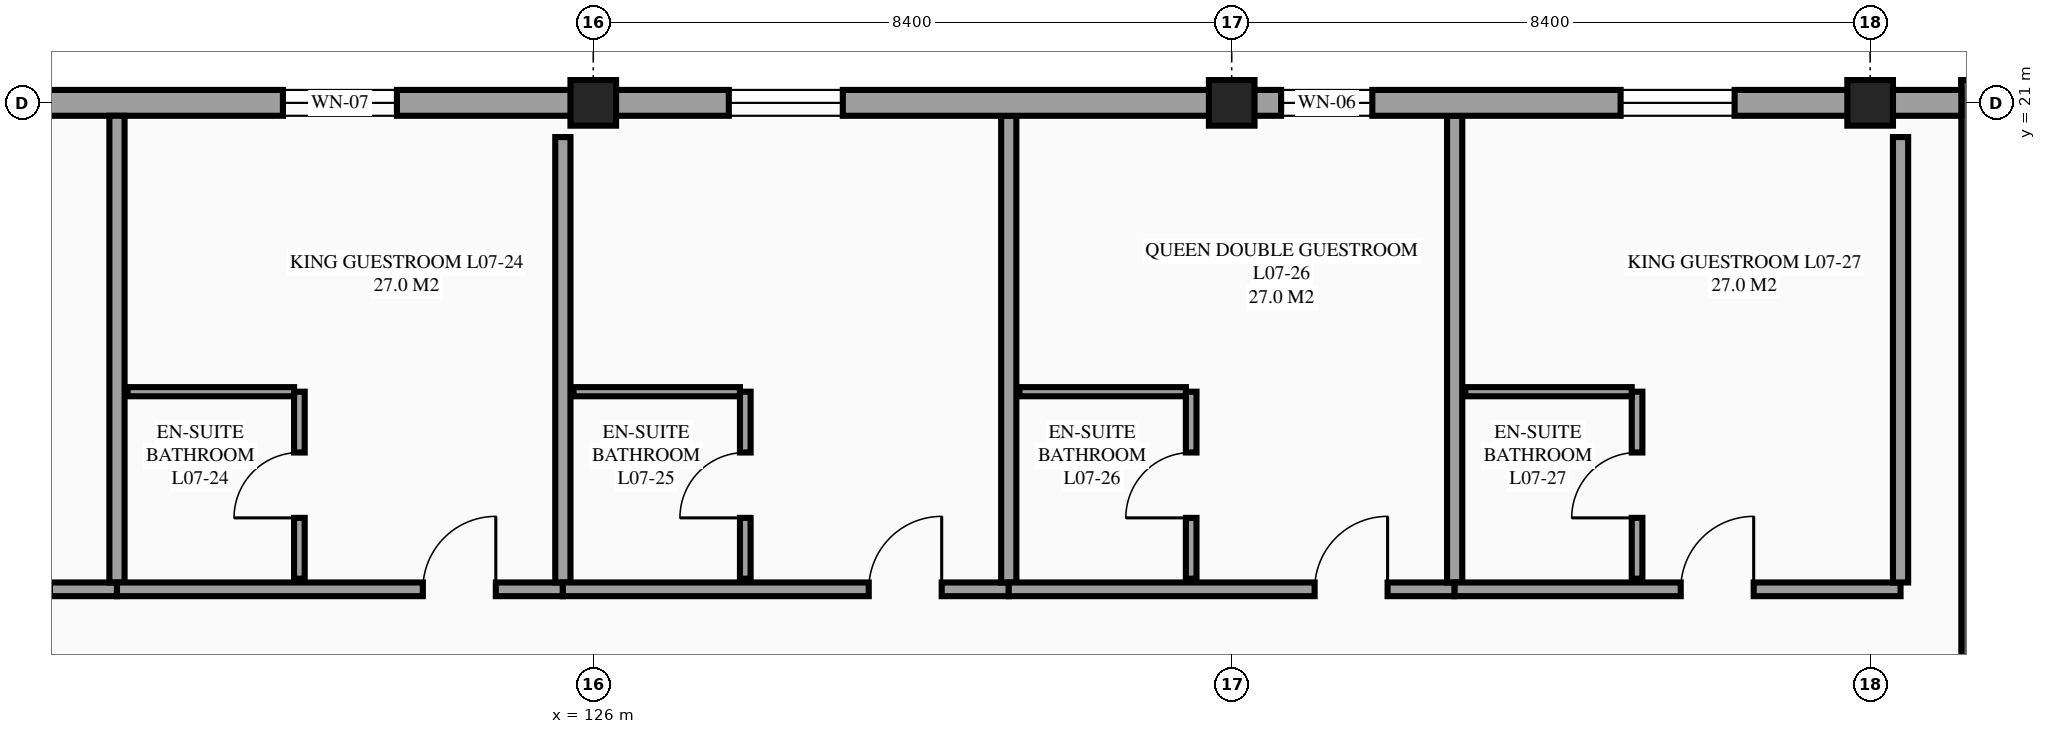
"""IFC4 building model, lengths in metres.
Left out: names, types, materials, properties, quantities, classifications, styles, units other than length and angle.
Written with IfcOpenShell. Run it as: python <this file> out.ifc"""

import sys

from ifc_helpers import new_model, si_unit, direction, frame, frame_2d, origin, origin_2d, place, context, subcontext, project, spatial, rectangle, extrude, element, fill, save


model = new_model("IFC4")
c1 = context("Model", 3, precision=1e-05, world=origin(), true_north=direction((0.0, 1.0)))
c2 = subcontext(c1, "Body", "Model", "MODEL_VIEW")
j1 = project(units=[si_unit("LENGTHUNIT", "METRE"), si_unit("PLANEANGLEUNIT", "RADIAN")], contexts=[c1])
p1 = place(None, origin())
s1 = spatial("IfcSite", under=j1, at=p1, CompositionType="ELEMENT")
p2 = place(p1, origin())
s2 = spatial("IfcBuilding", under=s1, at=p2, CompositionType="ELEMENT")
p3 = place(p2, frame((0.0, 0.0, 29.1)))
s3 = spatial("IfcBuildingStorey", under=s2, at=p3, CompositionType="ELEMENT", Elevation=29.1)
for number, where, z_axis, x_axis in (
    (1, (126.0, 21.0, 0.0), (0.0, 0.0, 1.0), (1.0, 0.0, 0.0)),
    (2, (134.4, 21.0, 0.0), (0.0, 0.0, 1.0), (1.0, 0.0, 0.0)),
    (3, (142.8, 21.0, 0.0), (0.0, 0.0, 1.0), (1.0, 0.0, 0.0)),
):
    element("IfcColumn", number, at=place(p3, frame(where, z_axis=z_axis, x_axis=x_axis)), inside=s3, PredefinedType="COLUMN", context=c2, shape_type="SweptSolid", body=[
        extrude(rectangle(XDim=0.6, YDim=0.6, at=origin_2d()), origin(), (0.0, 0.0, 1.0), 3.6),
    ])
p4 = place(p3, frame((126.0, 21.0, 0.0), z_axis=(0.0, 0.0, 1.0), x_axis=(-1.0, 0.0, 0.0)))
e4 = element("IfcWall", 4, at=p4, inside=s3, PredefinedType="STANDARD", context=c2, shape_type="SweptSolid", body=[
    extrude(rectangle(XDim=16.8, YDim=0.34, at=frame_2d((8.4, 0.0))), origin(), (0.0, 0.0, 1.0), 2.63),
])
p5 = place(p4, frame((14.317, 0.0, 0.85)))
e5 = element("IfcOpeningElement", 5, at=p5, cuts=e4, PredefinedType="OPENING", context=c2, shape_type="SweptSolid", body=[
    extrude(rectangle(XDim=1.5, YDim=1.5, at=frame_2d((0.75, 0.75))), frame((0.0, 0.18, 0.0), z_axis=(0.0, -1.0, 0.0), x_axis=(1.0, 0.0, 0.0)), (0.0, 0.0, 1.0), 0.36),
])
p6 = place(p4, frame((9.2, 0.0, 0.85)))
e6 = element("IfcOpeningElement", 6, at=p6, cuts=e4, PredefinedType="OPENING", context=c2, shape_type="SweptSolid", body=[
    extrude(rectangle(XDim=1.5, YDim=1.5, at=frame_2d((0.75, 0.75))), frame((0.0, 0.18, 0.0), z_axis=(0.0, -1.0, 0.0), x_axis=(1.0, 0.0, 0.0)), (0.0, 0.0, 1.0), 0.36),
])
p7 = place(p4, frame((2.583, 0.0, 0.85)))
e7 = element("IfcOpeningElement", 7, at=p7, cuts=e4, PredefinedType="OPENING", context=c2, shape_type="SweptSolid", body=[
    extrude(rectangle(XDim=1.5, YDim=1.5, at=frame_2d((0.75, 0.75))), frame((0.0, 0.18, 0.0), z_axis=(0.0, -1.0, 0.0), x_axis=(1.0, 0.0, 0.0)), (0.0, 0.0, 1.0), 0.36),
])
p8 = place(p3, frame((149.2, 21.15, 0.0), z_axis=(0.0, 0.0, 1.0), x_axis=(-1.0, 0.0, 0.0)))
e8 = element("IfcWall", 8, at=p8, inside=s3, PredefinedType="SHEAR", context=c2, shape_type="SweptSolid", body=[
    extrude(rectangle(XDim=5.2, YDim=0.3, at=frame_2d((2.6, 0.0))), origin(), (0.0, 0.0, 1.0), 3.6),
])
p9 = place(p3, frame((144.15, 21.3, 0.0), z_axis=(0.0, 0.0, 1.0), x_axis=(0.0, -1.0, 0.0)))
e9 = element("IfcWall", 9, at=p9, inside=s3, PredefinedType="SHEAR", context=c2, shape_type="SweptSolid", body=[
    extrude(rectangle(XDim=8.84, YDim=0.3, at=frame_2d((4.42, 0.0))), origin(), (0.0, 0.0, 1.0), 3.6),
])
p10 = place(p3, frame((113.867, 14.6, 0.0), z_axis=(0.0, 0.0, 1.0), x_axis=(1.0, 0.0, 0.0)))
e10 = element("IfcWall", 10, at=p10, inside=s3, PredefinedType="PARTITIONING", context=c2, shape_type="SweptSolid", body=[
    extrude(rectangle(XDim=5.867, YDim=0.18, at=frame_2d((2.933, 0.0))), origin(), (0.0, 0.0, 1.0), 3.375),
])
p11 = place(p10, frame((4.024, 0.0, 0.0)))
e11 = element("IfcOpeningElement", 11, at=p11, cuts=e10, PredefinedType="OPENING", context=c2, shape_type="SweptSolid", body=[
    extrude(rectangle(XDim=0.96, YDim=2.15, at=frame_2d((0.48, 1.075))), frame((0.0, 0.1, 0.0), z_axis=(0.0, -1.0, 0.0), x_axis=(1.0, 0.0, 0.0)), (0.0, 0.0, 1.0), 0.2),
])
p12 = place(p3, frame((119.733, 14.69, 0.0), z_axis=(0.0, 0.0, 1.0), x_axis=(0.0, 1.0, 0.0)))
e12 = element("IfcWall", 12, at=p12, inside=s3, PredefinedType="PARTITIONING", context=c2, shape_type="SweptSolid", body=[
    extrude(rectangle(XDim=6.14, YDim=0.2, at=frame_2d((3.07, 0.0))), origin(), (0.0, 0.0, 1.0), 3.375),
])
p13 = place(p3, frame((119.733, 14.6, 0.0), z_axis=(0.0, 0.0, 1.0), x_axis=(1.0, 0.0, 0.0)))
e13 = element("IfcWall", 13, at=p13, inside=s3, PredefinedType="PARTITIONING", context=c2, shape_type="SweptSolid", body=[
    extrude(rectangle(XDim=5.867, YDim=0.18, at=frame_2d((2.933, 0.0))), origin(), (0.0, 0.0, 1.0), 3.375),
])
p14 = place(p13, frame((4.024, 0.0, 0.0)))
e14 = element("IfcOpeningElement", 14, at=p14, cuts=e13, PredefinedType="OPENING", context=c2, shape_type="SweptSolid", body=[
    extrude(rectangle(XDim=0.96, YDim=2.15, at=frame_2d((0.48, 1.075))), frame((0.0, 0.1, 0.0), z_axis=(0.0, -1.0, 0.0), x_axis=(1.0, 0.0, 0.0)), (0.0, 0.0, 1.0), 0.2),
])
p15 = place(p3, frame((125.6, 14.69, 0.0), z_axis=(0.0, 0.0, 1.0), x_axis=(0.0, 1.0, 0.0)))
e15 = element("IfcWall", 15, at=p15, inside=s3, PredefinedType="PARTITIONING", context=c2, shape_type="SweptSolid", body=[
    extrude(rectangle(XDim=5.86, YDim=0.2, at=frame_2d((2.93, 0.0))), origin(), (0.0, 0.0, 1.0), 3.375),
])
p16 = place(p3, frame((122.133, 14.74, 0.0), z_axis=(0.0, 0.0, 1.0), x_axis=(0.0, 1.0, 0.0)))
e16 = element("IfcWall", 16, at=p16, inside=s3, PredefinedType="PARTITIONING", context=c2, shape_type="SweptSolid", body=[
    extrude(rectangle(XDim=2.46, YDim=0.14, at=frame_2d((1.23, 0.0))), origin(), (0.0, 0.0, 1.0), 3.375),
])
p17 = place(p16, frame((0.8, 0.0, 0.0)))
e17 = element("IfcOpeningElement", 17, at=p17, cuts=e16, PredefinedType="OPENING", context=c2, shape_type="SweptSolid", body=[
    extrude(rectangle(XDim=0.86, YDim=2.1, at=frame_2d((0.43, 1.05))), frame((0.0, 0.08, 0.0), z_axis=(0.0, -1.0, 0.0), x_axis=(1.0, 0.0, 0.0)), (0.0, 0.0, 1.0), 0.16),
])
p18 = place(p3, frame((119.873, 17.2, 0.0), z_axis=(0.0, 0.0, 1.0), x_axis=(1.0, 0.0, 0.0)))
e18 = element("IfcWall", 18, at=p18, inside=s3, PredefinedType="PARTITIONING", context=c2, shape_type="SweptSolid", body=[
    extrude(rectangle(XDim=2.19, YDim=0.12, at=frame_2d((1.095, 0.0))), origin(), (0.0, 0.0, 1.0), 3.375),
])
p19 = place(p3, frame((125.6, 14.6, 0.0), z_axis=(0.0, 0.0, 1.0), x_axis=(1.0, 0.0, 0.0)))
e19 = element("IfcWall", 19, at=p19, inside=s3, PredefinedType="PARTITIONING", context=c2, shape_type="SweptSolid", body=[
    extrude(rectangle(XDim=5.867, YDim=0.18, at=frame_2d((2.933, 0.0))), origin(), (0.0, 0.0, 1.0), 3.375),
])
p20 = place(p19, frame((4.024, 0.0, 0.0)))
e20 = element("IfcOpeningElement", 20, at=p20, cuts=e19, PredefinedType="OPENING", context=c2, shape_type="SweptSolid", body=[
    extrude(rectangle(XDim=0.96, YDim=2.15, at=frame_2d((0.48, 1.075))), frame((0.0, 0.1, 0.0), z_axis=(0.0, -1.0, 0.0), x_axis=(1.0, 0.0, 0.0)), (0.0, 0.0, 1.0), 0.2),
])
p21 = place(p3, frame((131.467, 14.69, 0.0), z_axis=(0.0, 0.0, 1.0), x_axis=(0.0, 1.0, 0.0)))
e21 = element("IfcWall", 21, at=p21, inside=s3, PredefinedType="PARTITIONING", context=c2, shape_type="SweptSolid", body=[
    extrude(rectangle(XDim=6.14, YDim=0.2, at=frame_2d((3.07, 0.0))), origin(), (0.0, 0.0, 1.0), 3.375),
])
p22 = place(p3, frame((128.0, 14.74, 0.0), z_axis=(0.0, 0.0, 1.0), x_axis=(0.0, 1.0, 0.0)))
e22 = element("IfcWall", 22, at=p22, inside=s3, PredefinedType="PARTITIONING", context=c2, shape_type="SweptSolid", body=[
    extrude(rectangle(XDim=2.46, YDim=0.14, at=frame_2d((1.23, 0.0))), origin(), (0.0, 0.0, 1.0), 3.375),
])
p23 = place(p22, frame((0.8, 0.0, 0.0)))
e23 = element("IfcOpeningElement", 23, at=p23, cuts=e22, PredefinedType="OPENING", context=c2, shape_type="SweptSolid", body=[
    extrude(rectangle(XDim=0.86, YDim=2.1, at=frame_2d((0.43, 1.05))), frame((0.0, 0.08, 0.0), z_axis=(0.0, -1.0, 0.0), x_axis=(1.0, 0.0, 0.0)), (0.0, 0.0, 1.0), 0.16),
])
p24 = place(p3, frame((125.74, 17.2, 0.0), z_axis=(0.0, 0.0, 1.0), x_axis=(1.0, 0.0, 0.0)))
e24 = element("IfcWall", 24, at=p24, inside=s3, PredefinedType="PARTITIONING", context=c2, shape_type="SweptSolid", body=[
    extrude(rectangle(XDim=2.19, YDim=0.12, at=frame_2d((1.095, 0.0))), origin(), (0.0, 0.0, 1.0), 3.375),
])
p25 = place(p3, frame((131.467, 14.6, 0.0), z_axis=(0.0, 0.0, 1.0), x_axis=(1.0, 0.0, 0.0)))
e25 = element("IfcWall", 25, at=p25, inside=s3, PredefinedType="PARTITIONING", context=c2, shape_type="SweptSolid", body=[
    extrude(rectangle(XDim=5.866, YDim=0.18, at=frame_2d((2.933, 0.0))), origin(), (0.0, 0.0, 1.0), 3.375),
])
p26 = place(p25, frame((4.024, 0.0, 0.0)))
e26 = element("IfcOpeningElement", 26, at=p26, cuts=e25, PredefinedType="OPENING", context=c2, shape_type="SweptSolid", body=[
    extrude(rectangle(XDim=0.96, YDim=2.15, at=frame_2d((0.48, 1.075))), frame((0.0, 0.1, 0.0), z_axis=(0.0, -1.0, 0.0), x_axis=(1.0, 0.0, 0.0)), (0.0, 0.0, 1.0), 0.2),
])
p27 = place(p3, frame((137.333, 14.69, 0.0), z_axis=(0.0, 0.0, 1.0), x_axis=(0.0, 1.0, 0.0)))
e27 = element("IfcWall", 27, at=p27, inside=s3, PredefinedType="PARTITIONING", context=c2, shape_type="SweptSolid", body=[
    extrude(rectangle(XDim=6.14, YDim=0.2, at=frame_2d((3.07, 0.0))), origin(), (0.0, 0.0, 1.0), 3.375),
])
p28 = place(p3, frame((133.867, 14.74, 0.0), z_axis=(0.0, 0.0, 1.0), x_axis=(0.0, 1.0, 0.0)))
e28 = element("IfcWall", 28, at=p28, inside=s3, PredefinedType="PARTITIONING", context=c2, shape_type="SweptSolid", body=[
    extrude(rectangle(XDim=2.46, YDim=0.14, at=frame_2d((1.23, 0.0))), origin(), (0.0, 0.0, 1.0), 3.375),
])
p29 = place(p28, frame((0.8, 0.0, 0.0)))
e29 = element("IfcOpeningElement", 29, at=p29, cuts=e28, PredefinedType="OPENING", context=c2, shape_type="SweptSolid", body=[
    extrude(rectangle(XDim=0.86, YDim=2.1, at=frame_2d((0.43, 1.05))), frame((0.0, 0.08, 0.0), z_axis=(0.0, -1.0, 0.0), x_axis=(1.0, 0.0, 0.0)), (0.0, 0.0, 1.0), 0.16),
])
p30 = place(p3, frame((131.607, 17.2, 0.0), z_axis=(0.0, 0.0, 1.0), x_axis=(1.0, 0.0, 0.0)))
e30 = element("IfcWall", 30, at=p30, inside=s3, PredefinedType="PARTITIONING", context=c2, shape_type="SweptSolid", body=[
    extrude(rectangle(XDim=2.19, YDim=0.12, at=frame_2d((1.095, 0.0))), origin(), (0.0, 0.0, 1.0), 3.375),
])
p31 = place(p3, frame((137.333, 14.6, 0.0), z_axis=(0.0, 0.0, 1.0), x_axis=(1.0, 0.0, 0.0)))
e31 = element("IfcWall", 31, at=p31, inside=s3, PredefinedType="PARTITIONING", context=c2, shape_type="SweptSolid", body=[
    extrude(rectangle(XDim=5.867, YDim=0.18, at=frame_2d((2.933, 0.0))), origin(), (0.0, 0.0, 1.0), 3.375),
])
p32 = place(p31, frame((2.974, 0.0, 0.0)))
e32 = element("IfcOpeningElement", 32, at=p32, cuts=e31, PredefinedType="OPENING", context=c2, shape_type="SweptSolid", body=[
    extrude(rectangle(XDim=0.96, YDim=2.15, at=frame_2d((0.48, 1.075))), frame((0.0, 0.1, 0.0), z_axis=(0.0, -1.0, 0.0), x_axis=(1.0, 0.0, 0.0)), (0.0, 0.0, 1.0), 0.2),
])
p33 = place(p3, frame((143.2, 14.69, 0.0), z_axis=(0.0, 0.0, 1.0), x_axis=(0.0, 1.0, 0.0)))
e33 = element("IfcWall", 33, at=p33, inside=s3, PredefinedType="PARTITIONING", context=c2, shape_type="SweptSolid", body=[
    extrude(rectangle(XDim=5.86, YDim=0.2, at=frame_2d((2.93, 0.0))), origin(), (0.0, 0.0, 1.0), 3.375),
])
p34 = place(p3, frame((139.733, 14.74, 0.0), z_axis=(0.0, 0.0, 1.0), x_axis=(0.0, 1.0, 0.0)))
e34 = element("IfcWall", 34, at=p34, inside=s3, PredefinedType="PARTITIONING", context=c2, shape_type="SweptSolid", body=[
    extrude(rectangle(XDim=2.46, YDim=0.14, at=frame_2d((1.23, 0.0))), origin(), (0.0, 0.0, 1.0), 3.375),
])
p35 = place(p34, frame((0.8, 0.0, 0.0)))
e35 = element("IfcOpeningElement", 35, at=p35, cuts=e34, PredefinedType="OPENING", context=c2, shape_type="SweptSolid", body=[
    extrude(rectangle(XDim=0.86, YDim=2.1, at=frame_2d((0.43, 1.05))), frame((0.0, 0.08, 0.0), z_axis=(0.0, -1.0, 0.0), x_axis=(1.0, 0.0, 0.0)), (0.0, 0.0, 1.0), 0.16),
])
p36 = place(p3, frame((137.473, 17.2, 0.0), z_axis=(0.0, 0.0, 1.0), x_axis=(1.0, 0.0, 0.0)))
e36 = element("IfcWall", 36, at=p36, inside=s3, PredefinedType="PARTITIONING", context=c2, shape_type="SweptSolid", body=[
    extrude(rectangle(XDim=2.19, YDim=0.12, at=frame_2d((1.095, 0.0))), origin(), (0.0, 0.0, 1.0), 3.375),
])
p37 = place(p3, frame((144.0, 21.0, 0.0), z_axis=(0.0, 0.0, 1.0), x_axis=(-1.0, 0.0, 0.0)))
e37 = element("IfcWall", 37, at=p37, inside=s3, PredefinedType="STANDARD", context=c2, shape_type="SweptSolid", body=[
    extrude(rectangle(XDim=9.6, YDim=0.34, at=frame_2d((4.8, 0.0))), origin(), (0.0, 0.0, 1.0), 2.68),
])
p38 = place(p37, frame((7.75, 0.0, 0.85)))
e38 = element("IfcOpeningElement", 38, at=p38, cuts=e37, PredefinedType="OPENING", context=c2, shape_type="SweptSolid", body=[
    extrude(rectangle(XDim=1.2, YDim=1.5, at=frame_2d((0.6, 0.75))), frame((0.0, 0.18, 0.0), z_axis=(0.0, -1.0, 0.0), x_axis=(1.0, 0.0, 0.0)), (0.0, 0.0, 1.0), 0.36),
])
p39 = place(p37, frame((2.983, 0.0, 0.85)))
e39 = element("IfcOpeningElement", 39, at=p39, cuts=e37, PredefinedType="OPENING", context=c2, shape_type="SweptSolid", body=[
    extrude(rectangle(XDim=1.5, YDim=1.5, at=frame_2d((0.75, 0.75))), frame((0.0, 0.18, 0.0), z_axis=(0.0, -1.0, 0.0), x_axis=(1.0, 0.0, 0.0)), (0.0, 0.0, 1.0), 0.36),
])
p40 = place(p3, frame((134.4, 21.0, 0.0), z_axis=(0.0, 0.0, 1.0), x_axis=(-1.0, 0.0, 0.0)))
e40 = element("IfcWall", 40, at=p40, inside=s3, PredefinedType="STANDARD", context=c2, shape_type="SweptSolid", body=[
    extrude(rectangle(XDim=8.4, YDim=0.34, at=frame_2d((4.2, 0.0))), origin(), (0.0, 0.0, 1.0), 3.133),
])
p41 = place(p40, frame((5.117, 0.0, 0.85)))
e41 = element("IfcOpeningElement", 41, at=p41, cuts=e40, PredefinedType="OPENING", context=c2, shape_type="SweptSolid", body=[
    extrude(rectangle(XDim=1.5, YDim=1.5, at=frame_2d((0.75, 0.75))), frame((0.0, 0.18, 0.0), z_axis=(0.0, -1.0, 0.0), x_axis=(1.0, 0.0, 0.0)), (0.0, 0.0, 1.0), 0.36),
])
p42 = place(p7, origin())
e42 = element("IfcWindow", 42, at=p42, inside=s3, PartitioningType="SINGLE_PANEL", PredefinedType="WINDOW", context=c2, shape_type="SweptSolid", body=[
    extrude(rectangle(XDim=1.5, YDim=1.5, at=frame_2d((0.75, 0.75))), frame((0.0, 0.03, 0.0), z_axis=(0.0, -1.0, 0.0), x_axis=(1.0, 0.0, 0.0)), (0.0, 0.0, 1.0), 0.06),
])
fill(e7, e42)
p43 = place(p41, origin())
e43 = element("IfcWindow", 43, at=p43, inside=s3, PartitioningType="SINGLE_PANEL", PredefinedType="WINDOW", context=c2, shape_type="SweptSolid", body=[
    extrude(rectangle(XDim=1.5, YDim=1.5, at=frame_2d((0.75, 0.75))), frame((0.0, 0.03, 0.0), z_axis=(0.0, -1.0, 0.0), x_axis=(1.0, 0.0, 0.0)), (0.0, 0.0, 1.0), 0.06),
])
fill(e41, e43)
p44 = place(p38, origin())
e44 = element("IfcWindow", 44, at=p44, inside=s3, PartitioningType="SINGLE_PANEL", PredefinedType="WINDOW", context=c2, shape_type="SweptSolid", body=[
    extrude(rectangle(XDim=1.2, YDim=1.5, at=frame_2d((0.6, 0.75))), frame((0.0, 0.03, 0.0), z_axis=(0.0, -1.0, 0.0), x_axis=(1.0, 0.0, 0.0)), (0.0, 0.0, 1.0), 0.06),
])
fill(e38, e44)
p45 = place(p39, origin())
e45 = element("IfcWindow", 45, at=p45, inside=s3, PartitioningType="SINGLE_PANEL", PredefinedType="WINDOW", context=c2, shape_type="SweptSolid", body=[
    extrude(rectangle(XDim=1.5, YDim=1.5, at=frame_2d((0.75, 0.75))), frame((0.0, 0.03, 0.0), z_axis=(0.0, -1.0, 0.0), x_axis=(1.0, 0.0, 0.0)), (0.0, 0.0, 1.0), 0.06),
])
fill(e39, e45)
p46 = place(p14, origin())
e46 = element("IfcDoor", 46, at=p46, inside=s3, OperationType="SINGLE_SWING_RIGHT", PredefinedType="DOOR", context=c2, shape_type="SweptSolid", body=[
    extrude(rectangle(XDim=0.96, YDim=2.15, at=frame_2d((0.48, 1.075))), frame((0.0, 0.025, 0.0), z_axis=(0.0, -1.0, 0.0), x_axis=(1.0, 0.0, 0.0)), (0.0, 0.0, 1.0), 0.05),
])
fill(e14, e46)
p47 = place(p17, origin())
e47 = element("IfcDoor", 47, at=p47, inside=s3, OperationType="SINGLE_SWING_LEFT", PredefinedType="DOOR", context=c2, shape_type="SweptSolid", body=[
    extrude(rectangle(XDim=0.86, YDim=2.1, at=frame_2d((0.43, 1.05))), frame((0.0, 0.025, 0.0), z_axis=(0.0, -1.0, 0.0), x_axis=(1.0, 0.0, 0.0)), (0.0, 0.0, 1.0), 0.05),
])
fill(e17, e47)
p48 = place(p20, origin())
e48 = element("IfcDoor", 48, at=p48, inside=s3, OperationType="SINGLE_SWING_RIGHT", PredefinedType="DOOR", context=c2, shape_type="SweptSolid", body=[
    extrude(rectangle(XDim=0.96, YDim=2.15, at=frame_2d((0.48, 1.075))), frame((0.0, 0.025, 0.0), z_axis=(0.0, -1.0, 0.0), x_axis=(1.0, 0.0, 0.0)), (0.0, 0.0, 1.0), 0.05),
])
fill(e20, e48)
p49 = place(p23, origin())
e49 = element("IfcDoor", 49, at=p49, inside=s3, OperationType="SINGLE_SWING_LEFT", PredefinedType="DOOR", context=c2, shape_type="SweptSolid", body=[
    extrude(rectangle(XDim=0.86, YDim=2.1, at=frame_2d((0.43, 1.05))), frame((0.0, 0.025, 0.0), z_axis=(0.0, -1.0, 0.0), x_axis=(1.0, 0.0, 0.0)), (0.0, 0.0, 1.0), 0.05),
])
fill(e23, e49)
p50 = place(p26, origin())
e50 = element("IfcDoor", 50, at=p50, inside=s3, OperationType="SINGLE_SWING_RIGHT", PredefinedType="DOOR", context=c2, shape_type="SweptSolid", body=[
    extrude(rectangle(XDim=0.96, YDim=2.15, at=frame_2d((0.48, 1.075))), frame((0.0, 0.025, 0.0), z_axis=(0.0, -1.0, 0.0), x_axis=(1.0, 0.0, 0.0)), (0.0, 0.0, 1.0), 0.05),
])
fill(e26, e50)
p51 = place(p29, origin())
e51 = element("IfcDoor", 51, at=p51, inside=s3, OperationType="SINGLE_SWING_LEFT", PredefinedType="DOOR", context=c2, shape_type="SweptSolid", body=[
    extrude(rectangle(XDim=0.86, YDim=2.1, at=frame_2d((0.43, 1.05))), frame((0.0, 0.025, 0.0), z_axis=(0.0, -1.0, 0.0), x_axis=(1.0, 0.0, 0.0)), (0.0, 0.0, 1.0), 0.05),
])
fill(e29, e51)
p52 = place(p32, origin())
e52 = element("IfcDoor", 52, at=p52, inside=s3, OperationType="SINGLE_SWING_RIGHT", PredefinedType="DOOR", context=c2, shape_type="SweptSolid", body=[
    extrude(rectangle(XDim=0.96, YDim=2.15, at=frame_2d((0.48, 1.075))), frame((0.0, 0.025, 0.0), z_axis=(0.0, -1.0, 0.0), x_axis=(1.0, 0.0, 0.0)), (0.0, 0.0, 1.0), 0.05),
])
fill(e32, e52)
p53 = place(p35, origin())
e53 = element("IfcDoor", 53, at=p53, inside=s3, OperationType="SINGLE_SWING_LEFT", PredefinedType="DOOR", context=c2, shape_type="SweptSolid", body=[
    extrude(rectangle(XDim=0.86, YDim=2.1, at=frame_2d((0.43, 1.05))), frame((0.0, 0.025, 0.0), z_axis=(0.0, -1.0, 0.0), x_axis=(1.0, 0.0, 0.0)), (0.0, 0.0, 1.0), 0.05),
])
fill(e35, e53)
save(model, sys.argv[1])
